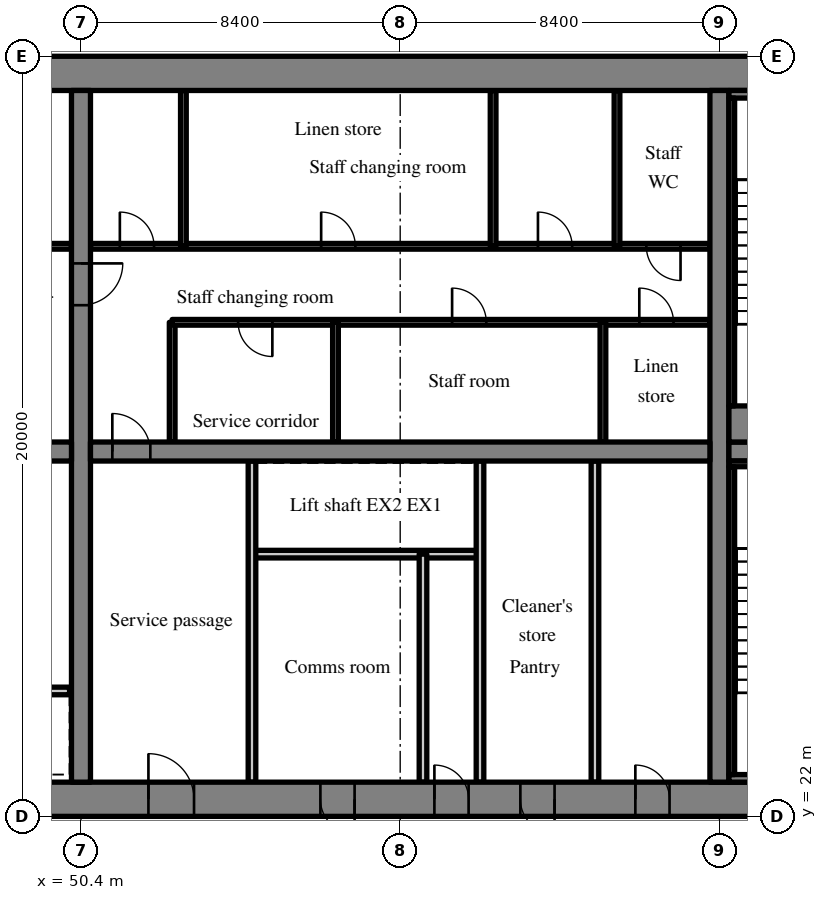
"""IFC4 building model, lengths in metres.
Left out: names, types, materials, properties, quantities, classifications, styles, units other than length and angle.
Written with IfcOpenShell. Run it as: python <this file> out.ifc"""

import sys

from ifc_helpers import new_model, si_unit, direction, frame, frame_2d, origin, place, context, subcontext, project, spatial, rectangle, extrude, source, transform, mapped, element, fill, save


model = new_model("IFC4")
c1 = context("Model", 3, precision=1e-05, world=origin(), true_north=direction((0.0, 1.0)))
c2 = subcontext(c1, "Body", "Model", "MODEL_VIEW")
j1 = project(units=[si_unit("LENGTHUNIT", "METRE"), si_unit("PLANEANGLEUNIT", "RADIAN")], contexts=[c1])
p1 = place(None, origin())
s1 = spatial("IfcSite", under=j1, at=p1, CompositionType="ELEMENT")
p2 = place(p1, origin())
s2 = spatial("IfcBuilding", under=s1, at=p2, CompositionType="ELEMENT")
p3 = place(p2, frame((0.0, 0.0, 133.2)))
s3 = spatial("IfcBuildingStorey", under=s2, at=p3, CompositionType="ELEMENT", Elevation=133.2)
m1 = source(origin(), c2, "Body", "SweptSolid", [
    extrude(rectangle(XDim=50.4, YDim=0.9, at=frame_2d((25.2, 0.0))), origin(), (0.0, 0.0, 1.0), 3.52),
])
p4 = place(p3, frame((25.2, 22.45, 0.0), z_axis=(0.0, 0.0, 1.0), x_axis=(1.0, 0.0, 0.0)))
e1 = element("IfcWall", 1, at=p4, inside=s3, PredefinedType="SHEAR", context=c2, shape_type="MappedRepresentation", body=[
    mapped(m1, transform((0.0, 0.0, 0.0), scale=1.0)),
])
m2 = source(origin(), c2, "Body", "SweptSolid", [
    extrude(rectangle(XDim=1.8, YDim=2.1, at=frame_2d((0.9, 1.05))), frame((0.0, 0.46, 0.0), z_axis=(0.0, -1.0, 0.0), x_axis=(1.0, 0.0, 0.0)), (0.0, 0.0, 1.0), 0.92),
])
p5 = place(p4, frame((15.9, 0.0, 0.0)))
e2 = element("IfcOpeningElement", 2, at=p5, cuts=e1, PredefinedType="OPENING", context=c2, shape_type="MappedRepresentation", body=[
    mapped(m2, transform((0.0, 0.0, 0.0), scale=1.0)),
])
m3 = source(origin(), c2, "Body", "SweptSolid", [
    extrude(rectangle(XDim=1.2, YDim=2.1, at=frame_2d((0.6, 1.05))), frame((0.0, 0.46, 0.0), z_axis=(0.0, -1.0, 0.0), x_axis=(1.0, 0.0, 0.0)), (0.0, 0.0, 1.0), 0.92),
])
p6 = place(p4, frame((26.975, 0.0, 0.0)))
e3 = element("IfcOpeningElement", 3, at=p6, cuts=e1, PredefinedType="OPENING", context=c2, shape_type="MappedRepresentation", body=[
    mapped(m3, transform((0.0, 0.0, 0.0), scale=1.0)),
])
m4 = source(origin(), c2, "Body", "SweptSolid", [
    extrude(rectangle(XDim=0.9, YDim=2.1, at=frame_2d((0.45, 1.05))), frame((0.0, 0.46, 0.0), z_axis=(0.0, -1.0, 0.0), x_axis=(1.0, 0.0, 0.0)), (0.0, 0.0, 1.0), 0.92),
])
p7 = place(p4, frame((34.5, 0.0, 0.0)))
e4 = element("IfcOpeningElement", 4, at=p7, cuts=e1, PredefinedType="OPENING", context=c2, shape_type="MappedRepresentation", body=[
    mapped(m4, transform((0.0, 0.0, 0.0), scale=1.0)),
])
p8 = place(p4, frame((31.5, 0.0, 0.0)))
e5 = element("IfcOpeningElement", 5, at=p8, cuts=e1, PredefinedType="OPENING", context=c2, shape_type="MappedRepresentation", body=[
    mapped(m4, transform((0.0, 0.0, 0.0), scale=1.0)),
])
p9 = place(p4, frame((39.788, 0.0, 0.0)))
e6 = element("IfcOpeningElement", 6, at=p9, cuts=e1, PredefinedType="OPENING", context=c2, shape_type="MappedRepresentation", body=[
    mapped(m4, transform((0.0, 0.0, 0.0), scale=1.0)),
])
p10 = place(p4, frame((36.762, 0.0, 0.0)))
e7 = element("IfcOpeningElement", 7, at=p10, cuts=e1, PredefinedType="OPENING", context=c2, shape_type="MappedRepresentation", body=[
    mapped(m4, transform((0.0, 0.0, 0.0), scale=1.0)),
])
p11 = place(p4, frame((6.45, 0.0, 0.0)))
e8 = element("IfcOpeningElement", 8, at=p11, cuts=e1, PredefinedType="OPENING", context=c2, shape_type="MappedRepresentation", body=[
    mapped(m3, transform((0.0, 0.0, 0.0), scale=1.0)),
])
p12 = place(p4, frame((47.775, 0.0, 0.0)))
e9 = element("IfcOpeningElement", 9, at=p12, cuts=e1, PredefinedType="OPENING", context=c2, shape_type="MappedRepresentation", body=[
    mapped(m3, transform((0.0, 0.0, 0.0), scale=1.0)),
])
p13 = place(p3, frame((25.2, 41.55, 0.0), z_axis=(0.0, 0.0, 1.0), x_axis=(1.0, 0.0, 0.0)))
e10 = element("IfcWall", 10, at=p13, inside=s3, PredefinedType="SHEAR", context=c2, shape_type="MappedRepresentation", body=[
    mapped(m1, transform((0.0, 0.0, 0.0), scale=1.0)),
])
m5 = source(origin(), c2, "Body", "SweptSolid", [
    extrude(rectangle(XDim=18.2, YDim=0.5, at=frame_2d((9.1, 0.0))), origin(), (0.0, 0.0, 1.0), 3.52),
])
p14 = place(p3, frame((50.4, 22.9, 0.0), z_axis=(0.0, 0.0, 1.0), x_axis=(0.0, 1.0, 0.0)))
e11 = element("IfcWall", 11, at=p14, inside=s3, PredefinedType="SHEAR", context=c2, shape_type="MappedRepresentation", body=[
    mapped(m5, transform((0.0, 0.0, 0.0), scale=1.0)),
])
m6 = source(origin(), c2, "Body", "SweptSolid", [
    extrude(rectangle(XDim=1.1, YDim=2.1, at=frame_2d((0.55, 1.05))), frame((0.0, 0.26, 0.0), z_axis=(0.0, -1.0, 0.0), x_axis=(1.0, 0.0, 0.0)), (0.0, 0.0, 1.0), 0.52),
])
p15 = place(p14, frame((12.55, 0.0, 0.0)))
e12 = element("IfcOpeningElement", 12, at=p15, cuts=e11, PredefinedType="OPENING", context=c2, shape_type="MappedRepresentation", body=[
    mapped(m6, transform((0.0, 0.0, 0.0), scale=1.0)),
])
p16 = place(p3, frame((67.2, 22.9, 0.0), z_axis=(0.0, 0.0, 1.0), x_axis=(0.0, 1.0, 0.0)))
e13 = element("IfcWall", 13, at=p16, inside=s3, PredefinedType="SHEAR", context=c2, shape_type="MappedRepresentation", body=[
    mapped(m5, transform((0.0, 0.0, 0.0), scale=1.0)),
])
m7 = source(origin(), c2, "Body", "SweptSolid", [
    extrude(rectangle(XDim=16.3, YDim=0.5, at=frame_2d((8.15, 0.0))), origin(), (0.0, 0.0, 1.0), 3.52),
])
p17 = place(p3, frame((33.85, 31.6, 0.0), z_axis=(0.0, 0.0, 1.0), x_axis=(1.0, 0.0, 0.0)))
e14 = element("IfcWall", 14, at=p17, inside=s3, PredefinedType="SHEAR", context=c2, shape_type="MappedRepresentation", body=[
    mapped(m7, transform((0.0, 0.0, 0.0), scale=1.0)),
])
m8 = source(origin(), c2, "Body", "SweptSolid", [
    extrude(rectangle(XDim=1.0, YDim=2.1, at=frame_2d((0.5, 1.05))), frame((0.0, 0.26, 0.0), z_axis=(0.0, -1.0, 0.0), x_axis=(1.0, 0.0, 0.0)), (0.0, 0.0, 1.0), 0.52),
])
p18 = place(p17, frame((14.725, 0.0, 0.0)))
e15 = element("IfcOpeningElement", 15, at=p18, cuts=e14, PredefinedType="OPENING", context=c2, shape_type="MappedRepresentation", body=[
    mapped(m8, transform((0.0, 0.0, 0.0), scale=1.0)),
])
m9 = source(origin(), c2, "Body", "SweptSolid", [
    extrude(rectangle(XDim=16.3, YDim=0.5, at=frame_2d((8.15, 0.0))), origin(), (0.0, 0.0, 1.0), 3.52),
])
p19 = place(p3, frame((50.65, 31.6, 0.0), z_axis=(0.0, 0.0, 1.0), x_axis=(1.0, 0.0, 0.0)))
e16 = element("IfcWall", 16, at=p19, inside=s3, PredefinedType="SHEAR", context=c2, shape_type="MappedRepresentation", body=[
    mapped(m9, transform((0.0, 0.0, 0.0), scale=1.0)),
])
p20 = place(p19, frame((0.575, 0.0, 0.0)))
e17 = element("IfcOpeningElement", 17, at=p20, cuts=e16, PredefinedType="OPENING", context=c2, shape_type="MappedRepresentation", body=[
    mapped(m8, transform((0.0, 0.0, 0.0), scale=1.0)),
])
m10 = source(origin(), c2, "Body", "SweptSolid", [
    extrude(rectangle(XDim=7.25, YDim=0.5, at=frame_2d((3.625, 0.0))), origin(), (0.0, 0.0, 1.0), 3.52),
])
p21 = place(p3, frame((67.45, 31.6, 0.0), z_axis=(0.0, 0.0, 1.0), x_axis=(1.0, 0.0, 0.0)))
e18 = element("IfcWall", 18, at=p21, inside=s3, PredefinedType="SHEAR", context=c2, shape_type="MappedRepresentation", body=[
    mapped(m10, transform((0.0, 0.0, 0.0), scale=1.0)),
])
p22 = place(p21, frame((5.575, 0.0, 0.0)))
e19 = element("IfcOpeningElement", 19, at=p22, cuts=e18, PredefinedType="OPENING", context=c2, shape_type="MappedRepresentation", body=[
    mapped(m6, transform((0.0, 0.0, 0.0), scale=1.0)),
])
m11 = source(origin(), c2, "Body", "SweptSolid", [
    extrude(rectangle(XDim=6.0, YDim=0.2, at=frame_2d((3.0, 0.0))), origin(), (0.0, 0.0, 1.0), 3.52),
])
p23 = place(p3, frame((44.1, 25.3, 0.0), z_axis=(0.0, 0.0, 1.0), x_axis=(1.0, 0.0, 0.0)))
e20 = element("IfcWall", 20, at=p23, inside=s3, PredefinedType="SOLIDWALL", context=c2, shape_type="MappedRepresentation", body=[
    mapped(m11, transform((0.0, 0.0, 0.0), scale=1.0)),
])
m12 = source(origin(), c2, "Body", "SweptSolid", [
    extrude(rectangle(XDim=1.1, YDim=2.1, at=frame_2d((0.55, 1.05))), frame((0.0, 0.11, 0.0), z_axis=(0.0, -1.0, 0.0), x_axis=(1.0, 0.0, 0.0)), (0.0, 0.0, 1.0), 0.22),
])
p24 = place(p23, frame((0.95, 0.0, 0.0)))
e21 = element("IfcOpeningElement", 21, at=p24, cuts=e20, PredefinedType="OPENING", context=c2, shape_type="MappedRepresentation", body=[
    mapped(m12, transform((0.0, 0.0, 0.0), scale=1.0)),
])
p25 = place(p23, frame((3.95, 0.0, 0.0)))
e22 = element("IfcOpeningElement", 22, at=p25, cuts=e20, PredefinedType="OPENING", context=c2, shape_type="MappedRepresentation", body=[
    mapped(m12, transform((0.0, 0.0, 0.0), scale=1.0)),
])
m13 = source(origin(), c2, "Body", "SweptSolid", [
    extrude(rectangle(XDim=16.3, YDim=0.15, at=frame_2d((8.15, 0.0))), origin(), (0.0, 0.0, 1.0), 3.52),
])
p26 = place(p3, frame((33.85, 37.0, 0.0), z_axis=(0.0, 0.0, 1.0), x_axis=(1.0, 0.0, 0.0)))
e23 = element("IfcWall", 23, at=p26, inside=s3, PredefinedType="PARTITIONING", context=c2, shape_type="MappedRepresentation", body=[
    mapped(m13, transform((0.0, 0.0, 0.0), scale=1.0)),
])
m14 = source(origin(), c2, "Body", "SweptSolid", [
    extrude(rectangle(XDim=0.9, YDim=2.1, at=frame_2d((0.45, 1.05))), frame((0.0, 0.085, 0.0), z_axis=(0.0, -1.0, 0.0), x_axis=(1.0, 0.0, 0.0)), (0.0, 0.0, 1.0), 0.17),
])
p27 = place(p26, frame((3.217, 0.0, 0.0)))
e24 = element("IfcOpeningElement", 24, at=p27, cuts=e23, PredefinedType="OPENING", context=c2, shape_type="MappedRepresentation", body=[
    mapped(m14, transform((0.0, 0.0, 0.0), scale=1.0)),
])
p28 = place(p26, frame((8.107, 0.0, 0.0)))
e25 = element("IfcOpeningElement", 25, at=p28, cuts=e23, PredefinedType="OPENING", context=c2, shape_type="MappedRepresentation", body=[
    mapped(m14, transform((0.0, 0.0, 0.0), scale=1.0)),
])
p29 = place(p26, frame((11.368, 0.0, 0.0)))
e26 = element("IfcOpeningElement", 26, at=p29, cuts=e23, PredefinedType="OPENING", context=c2, shape_type="MappedRepresentation", body=[
    mapped(m14, transform((0.0, 0.0, 0.0), scale=1.0)),
])
p30 = place(p26, frame((14.627, 0.0, 0.0)))
e27 = element("IfcOpeningElement", 27, at=p30, cuts=e23, PredefinedType="OPENING", context=c2, shape_type="MappedRepresentation", body=[
    mapped(m14, transform((0.0, 0.0, 0.0), scale=1.0)),
])
p31 = place(p3, frame((60.9, 28.9, 0.0), z_axis=(0.0, 0.0, 1.0), x_axis=(-1.0, 0.0, 0.0)))
e28 = element("IfcWall", 28, at=p31, inside=s3, PredefinedType="SOLIDWALL", context=c2, shape_type="MappedRepresentation", body=[
    mapped(m11, transform((0.0, 0.0, 0.0), scale=1.0)),
])
m15 = source(origin(), c2, "Body", "SweptSolid", [
    extrude(rectangle(XDim=8.45, YDim=0.2, at=frame_2d((4.225, 0.0))), origin(), (0.0, 0.0, 1.0), 3.52),
])
for number, where, z_axis, x_axis in (
    (29, (54.9, 22.9, 0.0), (0.0, 0.0, 1.0), (0.0, 1.0, 0.0)),
    (30, (60.9, 22.9, 0.0), (0.0, 0.0, 1.0), (0.0, 1.0, 0.0)),
):
    element("IfcWall", number, at=place(p3, frame(where, z_axis=z_axis, x_axis=x_axis)), inside=s3, PredefinedType="PARTITIONING", context=c2, shape_type="MappedRepresentation", body=[
        mapped(m15, transform((0.0, 0.0, 0.0), scale=1.0)),
    ])
p32 = place(p3, frame((59.4, 22.9, 0.0), z_axis=(0.0, 0.0, 1.0), x_axis=(0.0, 1.0, 0.0)))
e31 = element("IfcWall", 31, at=p32, inside=s3, PredefinedType="PARTITIONING", context=c2, shape_type="MappedRepresentation", body=[
    mapped(m11, transform((0.0, 0.0, 0.0), scale=1.0)),
])
p33 = place(p3, frame((63.925, 22.9, 0.0), z_axis=(0.0, 0.0, 1.0), x_axis=(0.0, 1.0, 0.0)))
e32 = element("IfcWall", 32, at=p33, inside=s3, PredefinedType="PARTITIONING", context=c2, shape_type="MappedRepresentation", body=[
    mapped(m15, transform((0.0, 0.0, 0.0), scale=1.0)),
])
m16 = source(origin(), c2, "Body", "SweptSolid", [
    extrude(rectangle(XDim=3.15, YDim=0.15, at=frame_2d((1.575, 0.0))), origin(), (0.0, 0.0, 1.0), 3.52),
])
p34 = place(p3, frame((52.8, 31.85, 0.0), z_axis=(0.0, 0.0, 1.0), x_axis=(0.0, 1.0, 0.0)))
e33 = element("IfcWall", 33, at=p34, inside=s3, PredefinedType="PARTITIONING", context=c2, shape_type="MappedRepresentation", body=[
    mapped(m16, transform((0.0, 0.0, 0.0), scale=1.0)),
])
m17 = source(origin(), c2, "Body", "SweptSolid", [
    extrude(rectangle(XDim=14.15, YDim=0.15, at=frame_2d((7.075, 0.0))), origin(), (0.0, 0.0, 1.0), 3.52),
])
p35 = place(p3, frame((66.95, 35.0, 0.0), z_axis=(0.0, 0.0, 1.0), x_axis=(-1.0, 0.0, 0.0)))
e34 = element("IfcWall", 34, at=p35, inside=s3, PredefinedType="PARTITIONING", context=c2, shape_type="MappedRepresentation", body=[
    mapped(m17, transform((0.0, 0.0, 0.0), scale=1.0)),
])
p36 = place(p35, frame((0.958, 0.0, 0.0)))
e35 = element("IfcOpeningElement", 35, at=p36, cuts=e34, PredefinedType="OPENING", context=c2, shape_type="MappedRepresentation", body=[
    mapped(m14, transform((0.0, 0.0, 0.0), scale=1.0)),
])
p37 = place(p35, frame((5.884, 0.0, 0.0)))
e36 = element("IfcOpeningElement", 36, at=p37, cuts=e34, PredefinedType="OPENING", context=c2, shape_type="MappedRepresentation", body=[
    mapped(m14, transform((0.0, 0.0, 0.0), scale=1.0)),
])
p38 = place(p35, frame((11.514, 0.0, 0.0)))
e37 = element("IfcOpeningElement", 37, at=p38, cuts=e34, PredefinedType="OPENING", context=c2, shape_type="MappedRepresentation", body=[
    mapped(m14, transform((0.0, 0.0, 0.0), scale=1.0)),
])
m18 = source(origin(), c2, "Body", "SweptSolid", [
    extrude(rectangle(XDim=16.3, YDim=0.15, at=frame_2d((8.15, 0.0))), origin(), (0.0, 0.0, 1.0), 3.52),
])
p39 = place(p3, frame((66.95, 37.0, 0.0), z_axis=(0.0, 0.0, 1.0), x_axis=(-1.0, 0.0, 0.0)))
e38 = element("IfcWall", 38, at=p39, inside=s3, PredefinedType="PARTITIONING", context=c2, shape_type="MappedRepresentation", body=[
    mapped(m18, transform((0.0, 0.0, 0.0), scale=1.0)),
])
p40 = place(p39, frame((0.773, 0.0, 0.0)))
e39 = element("IfcOpeningElement", 39, at=p40, cuts=e38, PredefinedType="OPENING", context=c2, shape_type="MappedRepresentation", body=[
    mapped(m14, transform((0.0, 0.0, 0.0), scale=1.0)),
])
p41 = place(p39, frame((3.625, 0.0, 0.0)))
e40 = element("IfcOpeningElement", 40, at=p41, cuts=e38, PredefinedType="OPENING", context=c2, shape_type="MappedRepresentation", body=[
    mapped(m14, transform((0.0, 0.0, 0.0), scale=1.0)),
])
p42 = place(p39, frame((9.33, 0.0, 0.0)))
e41 = element("IfcOpeningElement", 41, at=p42, cuts=e38, PredefinedType="OPENING", context=c2, shape_type="MappedRepresentation", body=[
    mapped(m14, transform((0.0, 0.0, 0.0), scale=1.0)),
])
p43 = place(p39, frame((14.627, 0.0, 0.0)))
e42 = element("IfcOpeningElement", 42, at=p43, cuts=e38, PredefinedType="OPENING", context=c2, shape_type="MappedRepresentation", body=[
    mapped(m14, transform((0.0, 0.0, 0.0), scale=1.0)),
])
for number, where, z_axis, x_axis in (
    (43, (64.135, 31.85, 0.0), (0.0, 0.0, 1.0), (0.0, 1.0, 0.0)),
    (44, (57.097, 31.85, 0.0), (0.0, 0.0, 1.0), (0.0, 1.0, 0.0)),
):
    element("IfcWall", number, at=place(p3, frame(where, z_axis=z_axis, x_axis=x_axis)), inside=s3, PredefinedType="PARTITIONING", context=c2, shape_type="MappedRepresentation", body=[
        mapped(m16, transform((0.0, 0.0, 0.0), scale=1.0)),
    ])
m19 = source(origin(), c2, "Body", "SweptSolid", [
    extrude(rectangle(XDim=4.1, YDim=0.15, at=frame_2d((2.05, 0.0))), origin(), (0.0, 0.0, 1.0), 3.52),
])
for number, where, z_axis, x_axis in (
    (45, (64.505, 37.0, 0.0), (0.0, 0.0, 1.0), (0.0, 1.0, 0.0)),
    (46, (61.245, 37.0, 0.0), (0.0, 0.0, 1.0), (0.0, 1.0, 0.0)),
    (47, (53.095, 37.0, 0.0), (0.0, 0.0, 1.0), (0.0, 1.0, 0.0)),
):
    element("IfcWall", number, at=place(p3, frame(where, z_axis=z_axis, x_axis=x_axis)), inside=s3, PredefinedType="PARTITIONING", context=c2, shape_type="MappedRepresentation", body=[
        mapped(m19, transform((0.0, 0.0, 0.0), scale=1.0)),
    ])
m20 = source(origin(), c2, "Body", "SweptSolid", [
    extrude(rectangle(XDim=4.8, YDim=0.2, at=frame_2d((2.4, 0.0))), origin(), (0.0, 0.0, 1.0), 3.52),
])
p44 = place(p3, frame((67.45, 23.0, 0.0), z_axis=(0.0, 0.0, 1.0), x_axis=(1.0, 0.0, 0.0)))
e48 = element("IfcWall", 48, at=p44, inside=s3, PredefinedType="SOLIDWALL", context=c2, shape_type="MappedRepresentation", body=[
    mapped(m20, transform((0.0, 0.0, 0.0), scale=1.0)),
])
m21 = source(origin(), c2, "Body", "SweptSolid", [
    extrude(rectangle(XDim=4.8, YDim=0.15, at=frame_2d((2.4, 0.0))), origin(), (0.0, 0.0, 1.0), 3.52),
])
p45 = place(p3, frame((67.45, 31.275, 0.0), z_axis=(0.0, 0.0, 1.0), x_axis=(1.0, 0.0, 0.0)))
e49 = element("IfcWall", 49, at=p45, inside=s3, PredefinedType="SOLIDWALL", context=c2, shape_type="MappedRepresentation", body=[
    mapped(m21, transform((0.0, 0.0, 0.0), scale=1.0)),
])
m22 = source(origin(), c2, "Body", "SweptSolid", [
    extrude(rectangle(XDim=8.1, YDim=0.15, at=frame_2d((4.05, 0.0))), origin(), (0.0, 0.0, 1.0), 3.52),
])
p46 = place(p3, frame((67.525, 23.1, 0.0), z_axis=(0.0, 0.0, 1.0), x_axis=(0.0, 1.0, 0.0)))
e50 = element("IfcWall", 50, at=p46, inside=s3, PredefinedType="SOLIDWALL", context=c2, shape_type="MappedRepresentation", body=[
    mapped(m22, transform((0.0, 0.0, 0.0), scale=1.0)),
])
p47 = place(p3, frame((67.45, 41.0, 0.0), z_axis=(0.0, 0.0, 1.0), x_axis=(1.0, 0.0, 0.0)))
e51 = element("IfcWall", 51, at=p47, inside=s3, PredefinedType="SOLIDWALL", context=c2, shape_type="MappedRepresentation", body=[
    mapped(m20, transform((0.0, 0.0, 0.0), scale=1.0)),
])
m23 = source(origin(), c2, "Body", "SweptSolid", [
    extrude(rectangle(XDim=4.8, YDim=0.95, at=frame_2d((2.4, 0.0))), origin(), (0.0, 0.0, 1.0), 3.52),
])
p48 = place(p3, frame((67.45, 32.325, 0.0), z_axis=(0.0, 0.0, 1.0), x_axis=(1.0, 0.0, 0.0)))
e52 = element("IfcWall", 52, at=p48, inside=s3, PredefinedType="SOLIDWALL", context=c2, shape_type="MappedRepresentation", body=[
    mapped(m23, transform((0.0, 0.0, 0.0), scale=1.0)),
])
p49 = place(p3, frame((67.525, 32.8, 0.0), z_axis=(0.0, 0.0, 1.0), x_axis=(0.0, 1.0, 0.0)))
e53 = element("IfcWall", 53, at=p49, inside=s3, PredefinedType="SOLIDWALL", context=c2, shape_type="MappedRepresentation", body=[
    mapped(m22, transform((0.0, 0.0, 0.0), scale=1.0)),
])
m24 = source(origin(), c2, "Body", "SweptSolid", [
    extrude(rectangle(XDim=1.2, YDim=2.1, at=frame_2d((0.6, 1.05))), frame((0.0, 0.375, 0.0), z_axis=(0.0, -1.0, 0.0), x_axis=(1.0, 0.0, 0.0)), (0.0, 0.0, 1.0), 0.05),
])
p50 = place(p6, origin())
e54 = element("IfcDoor", 54, at=p50, inside=s3, OperationType="SINGLE_SWING_LEFT", PredefinedType="DOOR", context=c2, shape_type="MappedRepresentation", body=[
    mapped(m24, transform((0.0, 0.0, 0.0), scale=1.0)),
])
fill(e3, e54)
m25 = source(origin(), c2, "Body", "SweptSolid", [
    extrude(rectangle(XDim=1.0, YDim=2.1, at=frame_2d((0.5, 1.05))), frame((0.0, 0.025, 0.0), z_axis=(0.0, -1.0, 0.0), x_axis=(1.0, 0.0, 0.0)), (0.0, 0.0, 1.0), 0.05),
])
p51 = place(p20, origin())
e55 = element("IfcDoor", 55, at=p51, inside=s3, OperationType="SINGLE_SWING_LEFT", PredefinedType="DOOR", context=c2, shape_type="MappedRepresentation", body=[
    mapped(m25, transform((0.0, 0.0, 0.0), scale=1.0)),
])
fill(e17, e55)
m26 = source(origin(), c2, "Body", "SweptSolid", [
    extrude(rectangle(XDim=0.9, YDim=2.1, at=frame_2d((0.45, 1.05))), frame((0.0, 0.375, 0.0), z_axis=(0.0, -1.0, 0.0), x_axis=(1.0, 0.0, 0.0)), (0.0, 0.0, 1.0), 0.05),
])
p52 = place(p7, origin())
e56 = element("IfcDoor", 56, at=p52, inside=s3, OperationType="SINGLE_SWING_LEFT", PredefinedType="DOOR", context=c2, shape_type="MappedRepresentation", body=[
    mapped(m26, transform((0.0, 0.0, 0.0), scale=1.0)),
])
fill(e4, e56)
p53 = place(p8, origin())
e57 = element("IfcDoor", 57, at=p53, inside=s3, OperationType="SINGLE_SWING_RIGHT", PredefinedType="DOOR", context=c2, shape_type="MappedRepresentation", body=[
    mapped(m26, transform((0.0, 0.0, 0.0), scale=1.0)),
])
fill(e5, e57)
p54 = place(p9, origin())
e58 = element("IfcDoor", 58, at=p54, inside=s3, OperationType="SINGLE_SWING_LEFT", PredefinedType="DOOR", context=c2, shape_type="MappedRepresentation", body=[
    mapped(m26, transform((0.0, 0.0, 0.0), scale=1.0)),
])
fill(e6, e58)
p55 = place(p10, origin())
e59 = element("IfcDoor", 59, at=p55, inside=s3, OperationType="SINGLE_SWING_RIGHT", PredefinedType="DOOR", context=c2, shape_type="MappedRepresentation", body=[
    mapped(m26, transform((0.0, 0.0, 0.0), scale=1.0)),
])
fill(e7, e59)
m27 = source(origin(), c2, "Body", "SweptSolid", [
    extrude(rectangle(XDim=0.9, YDim=2.1, at=frame_2d((0.45, 1.05))), frame((0.0, 0.025, 0.0), z_axis=(0.0, -1.0, 0.0), x_axis=(1.0, 0.0, 0.0)), (0.0, 0.0, 1.0), 0.05),
])
p56 = place(p36, origin())
e60 = element("IfcDoor", 60, at=p56, inside=s3, OperationType="SINGLE_SWING_RIGHT", PredefinedType="DOOR", context=c2, shape_type="MappedRepresentation", body=[
    mapped(m27, transform((0.0, 0.0, 0.0), scale=1.0)),
])
fill(e35, e60)
p57 = place(p37, origin())
e61 = element("IfcDoor", 61, at=p57, inside=s3, OperationType="SINGLE_SWING_RIGHT", PredefinedType="DOOR", context=c2, shape_type="MappedRepresentation", body=[
    mapped(m27, transform((0.0, 0.0, 0.0), scale=1.0)),
])
fill(e36, e61)
p58 = place(p38, origin())
e62 = element("IfcDoor", 62, at=p58, inside=s3, OperationType="SINGLE_SWING_LEFT", PredefinedType="DOOR", context=c2, shape_type="MappedRepresentation", body=[
    mapped(m27, transform((0.0, 0.0, 0.0), scale=1.0)),
])
fill(e37, e62)
p59 = place(p40, origin())
e63 = element("IfcDoor", 63, at=p59, inside=s3, OperationType="SINGLE_SWING_LEFT", PredefinedType="DOOR", context=c2, shape_type="MappedRepresentation", body=[
    mapped(m27, transform((0.0, 0.0, 0.0), scale=1.0)),
])
fill(e39, e63)
p60 = place(p41, origin())
e64 = element("IfcDoor", 64, at=p60, inside=s3, OperationType="SINGLE_SWING_RIGHT", PredefinedType="DOOR", context=c2, shape_type="MappedRepresentation", body=[
    mapped(m27, transform((0.0, 0.0, 0.0), scale=1.0)),
])
fill(e40, e64)
p61 = place(p42, origin())
e65 = element("IfcDoor", 65, at=p61, inside=s3, OperationType="SINGLE_SWING_RIGHT", PredefinedType="DOOR", context=c2, shape_type="MappedRepresentation", body=[
    mapped(m27, transform((0.0, 0.0, 0.0), scale=1.0)),
])
fill(e41, e65)
p62 = place(p43, origin())
e66 = element("IfcDoor", 66, at=p62, inside=s3, OperationType="SINGLE_SWING_RIGHT", PredefinedType="DOOR", context=c2, shape_type="MappedRepresentation", body=[
    mapped(m27, transform((0.0, 0.0, 0.0), scale=1.0)),
])
fill(e42, e66)
m28 = source(origin(), c2, "Body", "SweptSolid", [
    extrude(rectangle(XDim=1.1, YDim=2.1, at=frame_2d((0.55, 1.05))), frame((0.0, 0.025, 0.0), z_axis=(0.0, -1.0, 0.0), x_axis=(1.0, 0.0, 0.0)), (0.0, 0.0, 1.0), 0.05),
])
p63 = place(p15, origin())
e67 = element("IfcDoor", 67, at=p63, inside=s3, OperationType="SINGLE_SWING_RIGHT", PredefinedType="DOOR", context=c2, shape_type="MappedRepresentation", body=[
    mapped(m28, transform((0.0, 0.0, 0.0), scale=1.0)),
])
fill(e12, e67)
save(model, sys.argv[1])
